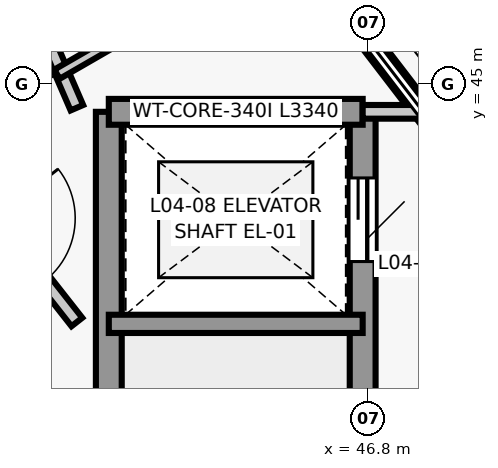
"""IFC4 building model, lengths in metres.
Left out: names, types, materials, properties, quantities, classifications, styles, units other than length and angle.
Written with IfcOpenShell. Run it as: python <this file> out.ifc"""

import sys

from ifc_helpers import new_model, si_unit, direction, frame, frame_2d, origin, place, context, subcontext, project, spatial, rectangle, extrude, element, fill, save


model = new_model("IFC4")
c1 = context("Model", 3, precision=1e-05, world=origin(), true_north=direction((0.0, 1.0)))
c2 = subcontext(c1, "Body", "Model", "MODEL_VIEW")
j1 = project(units=[si_unit("LENGTHUNIT", "METRE"), si_unit("PLANEANGLEUNIT", "RADIAN")], contexts=[c1])
p1 = place(None, origin())
s1 = spatial("IfcSite", under=j1, at=p1, CompositionType="ELEMENT")
p2 = place(p1, origin())
s2 = spatial("IfcBuilding", under=s1, at=p2, CompositionType="ELEMENT")
p3 = place(p2, frame((0.0, 0.0, 16.5)))
s3 = spatial("IfcBuildingStorey", under=s2, at=p3, CompositionType="ELEMENT", Elevation=16.5)
p4 = place(p3, frame((45.042, 33.371, 0.0), z_axis=(0.0, 0.0, 1.0), x_axis=(-0.608753590889, 0.79335935463, 0.0)))
e1 = element("IfcWall", 1, at=p4, inside=s3, PredefinedType="STANDARD", context=c2, shape_type="SweptSolid", body=[
    extrude(rectangle(XDim=10.852, YDim=0.28, at=frame_2d((5.426, 0.0))), origin(), (0.0, 0.0, 1.0), 0.82),
])
p5 = place(p3, frame((45.999, 46.62, 0.0), z_axis=(0.0, 0.0, 1.0), x_axis=(0.608769580289, -0.793347085527, 0.0)))
e2 = element("IfcWall", 2, at=p5, inside=s3, PredefinedType="STANDARD", context=c2, shape_type="SweptSolid", body=[
    extrude(rectangle(XDim=9.005, YDim=0.25, at=frame_2d((4.502, 0.0))), origin(), (0.0, 0.0, 1.0), 0.82),
])
p6 = place(p3, frame((46.731, 44.63, 0.0), z_axis=(0.0, 0.0, 1.0), x_axis=(0.0, -1.0, 0.0)))
e3 = element("IfcWall", 3, at=p6, inside=s3, PredefinedType="SHEAR", context=c2, shape_type="SweptSolid", body=[
    extrude(rectangle(XDim=9.73, YDim=0.34, at=frame_2d((4.865, 0.0))), origin(), (0.0, 0.0, 1.0), 3.9),
])
p7 = place(p6, frame((8.265, 0.0, 0.0)))
e4 = element("IfcOpeningElement", 4, at=p7, cuts=e3, PredefinedType="OPENING", context=c2, shape_type="SweptSolid", body=[
    extrude(rectangle(XDim=1.15, YDim=2.15, at=frame_2d((0.575, 1.075))), frame((0.0, 0.18, 0.0), z_axis=(0.0, -1.0, 0.0), x_axis=(1.0, 0.0, 0.0)), (0.0, 0.0, 1.0), 0.36),
])
p8 = place(p6, frame((0.87, 0.0, 0.0)))
e5 = element("IfcOpeningElement", 5, at=p8, cuts=e3, PredefinedType="OPENING", context=c2, shape_type="SweptSolid", body=[
    extrude(rectangle(XDim=1.1, YDim=2.15, at=frame_2d((0.55, 1.075))), frame((0.0, 0.18, 0.0), z_axis=(0.0, -1.0, 0.0), x_axis=(1.0, 0.0, 0.0)), (0.0, 0.0, 1.0), 0.36),
])
p9 = place(p3, frame((43.391, 34.9, 0.0), z_axis=(0.0, 0.0, 1.0), x_axis=(0.0, 1.0, 0.0)))
e6 = element("IfcWall", 6, at=p9, inside=s3, PredefinedType="SHEAR", context=c2, shape_type="SweptSolid", body=[
    extrude(rectangle(XDim=9.73, YDim=0.34, at=frame_2d((4.865, 0.0))), origin(), (0.0, 0.0, 1.0), 3.9),
])
p10 = place(p3, frame((43.391, 44.63, 0.0), z_axis=(0.0, 0.0, 1.0), x_axis=(1.0, 0.0, 0.0)))
e7 = element("IfcWall", 7, at=p10, inside=s3, PredefinedType="SHEAR", context=c2, shape_type="SweptSolid", body=[
    extrude(rectangle(XDim=3.34, YDim=0.34, at=frame_2d((1.67, 0.0))), origin(), (0.0, 0.0, 1.0), 3.9),
])
p11 = place(p3, frame((46.731, 41.84, 0.0), z_axis=(0.0, 0.0, 1.0), x_axis=(-1.0, 0.0, 0.0)))
e8 = element("IfcWall", 8, at=p11, inside=s3, PredefinedType="SHEAR", context=c2, shape_type="SweptSolid", body=[
    extrude(rectangle(XDim=3.34, YDim=0.24, at=frame_2d((1.67, 0.0))), origin(), (0.0, 0.0, 1.0), 3.9),
])
p12 = place(p3, frame((46.731, 44.63, 0.0), z_axis=(0.0, 0.0, 1.0), x_axis=(1.0, 0.0, 0.0)))
e9 = element("IfcWall", 9, at=p12, inside=s3, PredefinedType="PARTITIONING", context=c2, shape_type="SweptSolid", body=[
    extrude(rectangle(XDim=2.25, YDim=0.18, at=frame_2d((1.125, 0.0))), origin(), (0.0, 0.0, 1.0), 3.635),
])
p13 = place(p3, frame((38.829, 54.268, 0.0), z_axis=(0.0, 0.0, 1.0), x_axis=(0.3967423678, -0.917930004735, 0.0)))
e10 = element("IfcWall", 10, at=p13, inside=s3, PredefinedType="PARTITIONING", context=c2, shape_type="SweptSolid", body=[
    extrude(rectangle(XDim=10.441, YDim=0.18, at=frame_2d((5.22, 0.0))), origin(), (0.0, 0.0, 1.0), 3.635),
])
p14 = place(p13, frame((4.746, 0.0, 0.0)))
e11 = element("IfcOpeningElement", 11, at=p14, cuts=e10, PredefinedType="OPENING", context=c2, shape_type="SweptSolid", body=[
    extrude(rectangle(XDim=0.95, YDim=2.1, at=frame_2d((0.475, 1.05))), frame((0.0, 0.1, 0.0), z_axis=(0.0, -1.0, 0.0), x_axis=(1.0, 0.0, 0.0)), (0.0, 0.0, 1.0), 0.2),
])
p15 = place(p3, frame((41.475, 43.77, 0.0), z_axis=(0.0, 0.0, 1.0), x_axis=(0.61738089069, -0.78666437304, 0.0)))
e12 = element("IfcWall", 12, at=p15, inside=s3, PredefinedType="PARTITIONING", context=c2, shape_type="SweptSolid", body=[
    extrude(rectangle(XDim=2.423, YDim=0.18, at=frame_2d((1.211, 0.0))), origin(), (0.0, 0.0, 1.0), 3.635),
])
p16 = place(p15, frame((0.686, 0.0, 0.0)))
e13 = element("IfcOpeningElement", 13, at=p16, cuts=e12, PredefinedType="OPENING", context=c2, shape_type="SweptSolid", body=[
    extrude(rectangle(XDim=1.05, YDim=2.1, at=frame_2d((0.525, 1.05))), frame((0.0, 0.1, 0.0), z_axis=(0.0, -1.0, 0.0), x_axis=(1.0, 0.0, 0.0)), (0.0, 0.0, 1.0), 0.2),
])
p17 = place(p3, frame((45.308, 46.625, 0.0), z_axis=(0.0, 0.0, 1.0), x_axis=(-0.866031096941, -0.499990139034, 0.0)))
e14 = element("IfcWall", 14, at=p17, inside=s3, PredefinedType="PARTITIONING", context=c2, shape_type="SweptSolid", body=[
    extrude(rectangle(XDim=3.0, YDim=0.14, at=frame_2d((1.5, 0.0))), origin(), (0.0, 0.0, 1.0), 2.997),
])
p18 = place(p8, origin())
e15 = element("IfcDoor", 15, at=p18, inside=s3, OperationType="SLIDING_TO_LEFT", PredefinedType="DOOR", context=c2, shape_type="SweptSolid", body=[
    extrude(rectangle(XDim=1.1, YDim=2.15, at=frame_2d((0.55, 1.075))), frame((0.0, 0.025, 0.0), z_axis=(0.0, -1.0, 0.0), x_axis=(1.0, 0.0, 0.0)), (0.0, 0.0, 1.0), 0.05),
])
fill(e5, e15)
save(model, sys.argv[1])
